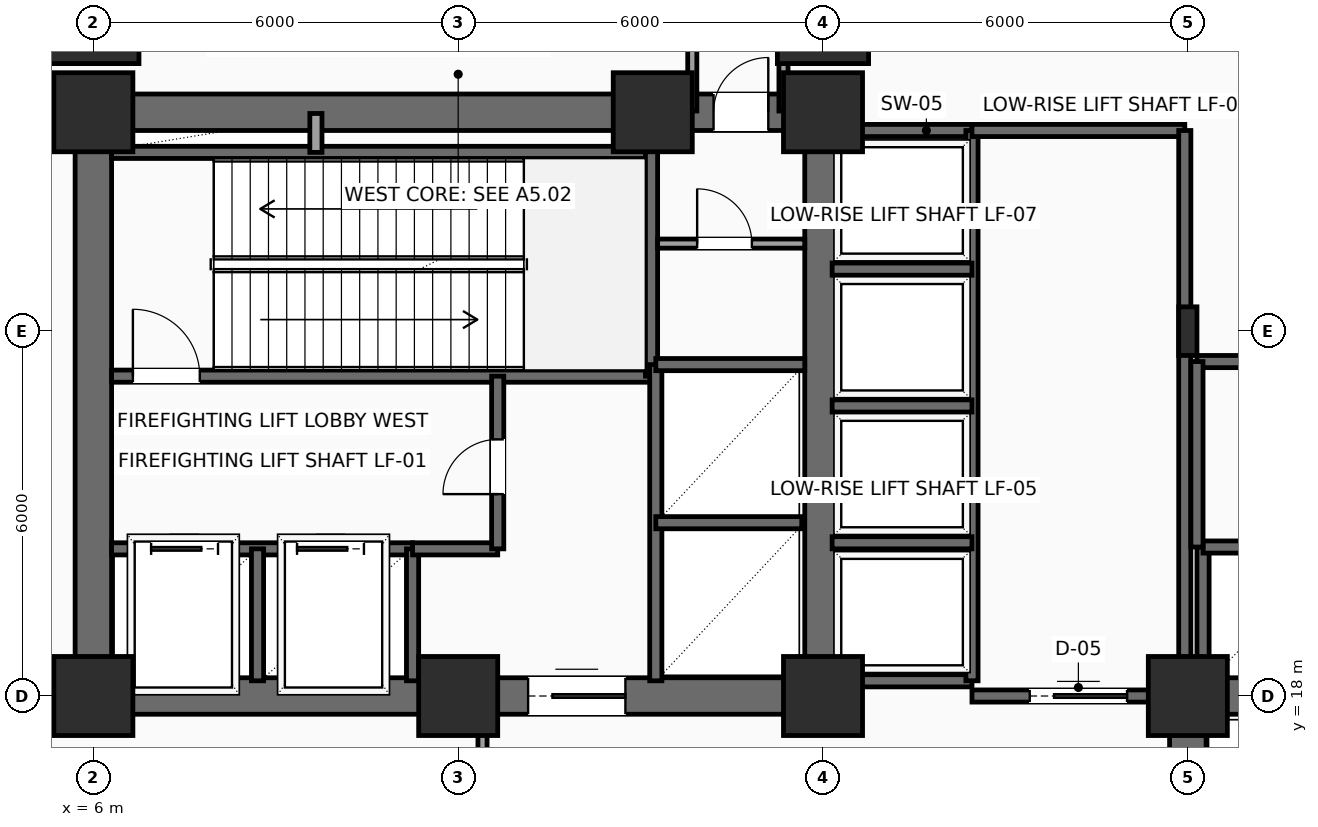
"""IFC4 building model, lengths in metres.
Left out: names, types, materials, properties, quantities, classifications, styles, units other than length and angle.
Written with IfcOpenShell. Run it as: python <this file> out.ifc"""

import sys

from ifc_helpers import new_model, si_unit, direction, frame, frame_2d, origin, origin_2d, place, context, subcontext, project, spatial, rectangle, i_section, extrude, element, fill, save


model = new_model("IFC4")
c1 = context("Model", 3, precision=1e-05, world=origin(), true_north=direction((0.0, 1.0)))
c2 = subcontext(c1, "Body", "Model", "MODEL_VIEW")
j1 = project(units=[si_unit("LENGTHUNIT", "METRE"), si_unit("PLANEANGLEUNIT", "RADIAN")], contexts=[c1])
p1 = place(None, origin())
s1 = spatial("IfcSite", under=j1, at=p1, CompositionType="ELEMENT")
p2 = place(p1, origin())
s2 = spatial("IfcBuilding", under=s1, at=p2, CompositionType="ELEMENT")
p3 = place(p2, frame((0.0, 0.0, 16.5)))
s3 = spatial("IfcBuildingStorey", under=s2, at=p3, CompositionType="ELEMENT", Elevation=16.5)
for number, where, z_axis, x_axis in (
    (1, (6.0, 18.0, 0.0), (0.0, 0.0, 1.0), (1.0, 0.0, 0.0)),
    (2, (12.0, 18.0, 0.0), (0.0, 0.0, 1.0), (1.0, 0.0, 0.0)),
    (3, (18.0, 18.0, 0.0), (0.0, 0.0, 1.0), (1.0, 0.0, 0.0)),
    (4, (6.0, 27.6, 0.0), (0.0, 0.0, 1.0), (1.0, 0.0, 0.0)),
    (5, (15.2, 27.6, 0.0), (0.0, 0.0, 1.0), (1.0, 0.0, 0.0)),
    (6, (18.0, 27.6, 0.0), (0.0, 0.0, 1.0), (1.0, 0.0, 0.0)),
    (7, (24.0, 18.0, 0.0), (0.0, 0.0, 1.0), (1.0, 0.0, 0.0)),
):
    element("IfcColumn", number, at=place(p3, frame(where, z_axis=z_axis, x_axis=x_axis)), inside=s3, PredefinedType="COLUMN", context=c2, shape_type="SweptSolid", body=[
        extrude(rectangle(XDim=1.3, YDim=1.3, at=origin_2d()), origin(), (0.0, 0.0, 1.0), 5.4),
    ])
for number, where, z_axis, x_axis in (
    (8, (6.0, 29.15, 0.0), (0.0, 0.0, 1.0), (1.0, 0.0, 0.0)),
    (9, (18.0, 29.15, 0.0), (0.0, 0.0, 1.0), (1.0, 0.0, 0.0)),
):
    element("IfcColumn", number, at=place(p3, frame(where, z_axis=z_axis, x_axis=x_axis)), inside=s3, PredefinedType="COLUMN", context=c2, shape_type="SweptSolid", body=[
        extrude(rectangle(XDim=1.5, YDim=1.5, at=origin_2d()), origin(), (0.0, 0.0, 1.0), 5.4),
    ])
p4 = place(p3, frame((24.0, 24.0, 0.0), z_axis=(0.0, 0.0, 1.0), x_axis=(1.0, 0.0, 0.0)))
e10 = element("IfcColumn", 10, at=p4, inside=s3, PredefinedType="COLUMN", context=c2, shape_type="SweptSolid", body=[
    extrude(i_section(OverallWidth=0.3, OverallDepth=0.8, WebThickness=0.018, FlangeThickness=0.033, FilletRadius=0.03, at=origin_2d()), origin(), (0.0, 0.0, 1.0), 5.4),
])
p5 = place(p3, frame((6.0, 18.0, 0.0), z_axis=(0.0, 0.0, 1.0), x_axis=(1.0, 0.0, 0.0)))
e11 = element("IfcWall", 11, at=p5, inside=s3, PredefinedType="SHEAR", context=c2, shape_type="SweptSolid", body=[
    extrude(rectangle(XDim=12.0, YDim=0.6, at=frame_2d((6.0, 0.0))), origin(), (0.0, 0.0, 1.0), 5.125),
])
p6 = place(p5, frame((7.15, 0.0, 0.0)))
e12 = element("IfcOpeningElement", 12, at=p6, cuts=e11, PredefinedType="OPENING", context=c2, shape_type="SweptSolid", body=[
    extrude(rectangle(XDim=1.6, YDim=2.3, at=frame_2d((0.8, 1.15))), frame((0.0, 0.31, 0.0), z_axis=(0.0, -1.0, 0.0), x_axis=(1.0, 0.0, 0.0)), (0.0, 0.0, 1.0), 0.62),
])
p7 = place(p3, frame((6.0, 27.6, 0.0), z_axis=(0.0, 0.0, 1.0), x_axis=(1.0, 0.0, 0.0)))
e13 = element("IfcWall", 13, at=p7, inside=s3, PredefinedType="SHEAR", context=c2, shape_type="SweptSolid", body=[
    extrude(rectangle(XDim=12.0, YDim=0.6, at=frame_2d((6.0, 0.0))), origin(), (0.0, 0.0, 1.0), 5.125),
])
p8 = place(p7, frame((10.2, 0.0, 0.0)))
e14 = element("IfcOpeningElement", 14, at=p8, cuts=e13, PredefinedType="OPENING", context=c2, shape_type="SweptSolid", body=[
    extrude(rectangle(XDim=0.9, YDim=2.15, at=frame_2d((0.45, 1.075))), frame((0.0, 0.31, 0.0), z_axis=(0.0, -1.0, 0.0), x_axis=(1.0, 0.0, 0.0)), (0.0, 0.0, 1.0), 0.62),
])
for number, where, z_axis, x_axis in (
    (15, (6.0, 18.0, 0.0), (0.0, 0.0, 1.0), (0.0, 1.0, 0.0)),
    (16, (18.0, 18.0, 0.0), (0.0, 0.0, 1.0), (0.0, 1.0, 0.0)),
    (17, (24.0, 18.0, 0.0), (0.0, 0.0, 1.0), (1.0, 0.0, 0.0)),
):
    element("IfcWall", number, at=place(p3, frame(where, z_axis=z_axis, x_axis=x_axis)), inside=s3, PredefinedType="SHEAR", context=c2, shape_type="SweptSolid", body=[
        extrude(rectangle(XDim=9.6, YDim=0.6, at=frame_2d((4.8, 0.0))), origin(), (0.0, 0.0, 1.0), 5.125),
    ])
p9 = place(p3, frame((24.0, 6.0, 0.0), z_axis=(0.0, 0.0, 1.0), x_axis=(0.0, 1.0, 0.0)))
e18 = element("IfcWall", 18, at=p9, inside=s3, PredefinedType="SHEAR", context=c2, shape_type="SweptSolid", body=[
    extrude(rectangle(XDim=12.0, YDim=0.6, at=frame_2d((6.0, 0.0))), origin(), (0.0, 0.0, 1.0), 5.125),
])
p10 = place(p9, frame((7.15, 0.0, 0.0)))
e19 = element("IfcOpeningElement", 19, at=p10, cuts=e18, PredefinedType="OPENING", context=c2, shape_type="SweptSolid", body=[
    extrude(rectangle(XDim=1.6, YDim=2.3, at=frame_2d((0.8, 1.15))), frame((0.0, 0.31, 0.0), z_axis=(0.0, -1.0, 0.0), x_axis=(1.0, 0.0, 0.0)), (0.0, 0.0, 1.0), 0.62),
])
p11 = place(p3, frame((6.3, 23.26, 0.0), z_axis=(0.0, 0.0, 1.0), x_axis=(1.0, 0.0, 0.0)))
e20 = element("IfcWall", 20, at=p11, inside=s3, PredefinedType="SHEAR", context=c2, shape_type="SweptSolid", body=[
    extrude(rectangle(XDim=8.88, YDim=0.2, at=frame_2d((4.44, 0.0))), origin(), (0.0, 0.0, 1.0), 5.125),
])
p12 = place(p11, frame((0.35, 0.0, 0.0)))
e21 = element("IfcOpeningElement", 21, at=p12, cuts=e20, PredefinedType="OPENING", context=c2, shape_type="SweptSolid", body=[
    extrude(rectangle(XDim=1.1, YDim=2.2, at=frame_2d((0.55, 1.1))), frame((0.0, 0.11, 0.0), z_axis=(0.0, -1.0, 0.0), x_axis=(1.0, 0.0, 0.0)), (0.0, 0.0, 1.0), 0.22),
])
p13 = place(p3, frame((6.3, 26.94, 0.0), z_axis=(0.0, 0.0, 1.0), x_axis=(1.0, 0.0, 0.0)))
e22 = element("IfcWall", 22, at=p13, inside=s3, PredefinedType="SHEAR", context=c2, shape_type="SweptSolid", body=[
    extrude(rectangle(XDim=8.88, YDim=0.2, at=frame_2d((4.44, 0.0))), origin(), (0.0, 0.0, 1.0), 5.125),
])
p14 = place(p3, frame((15.18, 23.26, 0.0), z_axis=(0.0, 0.0, 1.0), x_axis=(0.0, 1.0, 0.0)))
e23 = element("IfcWall", 23, at=p14, inside=s3, PredefinedType="SHEAR", context=c2, shape_type="SweptSolid", body=[
    extrude(rectangle(XDim=4.04, YDim=0.2, at=frame_2d((2.02, 0.0))), origin(), (0.0, 0.0, 1.0), 5.125),
])
p15 = place(p3, frame((6.3, 20.42, 0.0), z_axis=(0.0, 0.0, 1.0), x_axis=(1.0, 0.0, 0.0)))
e24 = element("IfcWall", 24, at=p15, inside=s3, PredefinedType="SHEAR", context=c2, shape_type="SweptSolid", body=[
    extrude(rectangle(XDim=4.95, YDim=0.2, at=frame_2d((2.475, 0.0))), origin(), (0.0, 0.0, 1.0), 5.125),
])
p16 = place(p15, frame((0.65, 0.0, 0.0)))
e25 = element("IfcOpeningElement", 25, at=p16, cuts=e24, PredefinedType="OPENING", context=c2, shape_type="SweptSolid", body=[
    extrude(rectangle(XDim=1.1, YDim=2.2, at=frame_2d((0.55, 1.1))), frame((0.0, 0.11, 0.0), z_axis=(0.0, -1.0, 0.0), x_axis=(1.0, 0.0, 0.0)), (0.0, 0.0, 1.0), 0.22),
])
p17 = place(p15, frame((3.05, 0.0, 0.0)))
e26 = element("IfcOpeningElement", 26, at=p17, cuts=e24, PredefinedType="OPENING", context=c2, shape_type="SweptSolid", body=[
    extrude(rectangle(XDim=1.1, YDim=2.2, at=frame_2d((0.55, 1.1))), frame((0.0, 0.11, 0.0), z_axis=(0.0, -1.0, 0.0), x_axis=(1.0, 0.0, 0.0)), (0.0, 0.0, 1.0), 0.22),
])
for number, where, z_axis, x_axis in (
    (27, (8.7, 18.25, 0.0), (0.0, 0.0, 1.0), (0.0, 1.0, 0.0)),
    (28, (11.25, 18.25, 0.0), (0.0, 0.0, 1.0), (0.0, 1.0, 0.0)),
):
    element("IfcWall", number, at=place(p3, frame(where, z_axis=z_axis, x_axis=x_axis)), inside=s3, PredefinedType="SHEAR", context=c2, shape_type="SweptSolid", body=[
        extrude(rectangle(XDim=2.17, YDim=0.2, at=frame_2d((1.085, 0.0))), origin(), (0.0, 0.0, 1.0), 5.125),
    ])
p18 = place(p3, frame((11.25, 20.42, 0.0), z_axis=(0.0, 0.0, 1.0), x_axis=(1.0, 0.0, 0.0)))
e29 = element("IfcWall", 29, at=p18, inside=s3, PredefinedType="SHEAR", context=c2, shape_type="SweptSolid", body=[
    extrude(rectangle(XDim=1.4, YDim=0.2, at=frame_2d((0.7, 0.0))), origin(), (0.0, 0.0, 1.0), 5.125),
])
p19 = place(p3, frame((12.65, 20.42, 0.0), z_axis=(0.0, 0.0, 1.0), x_axis=(0.0, 1.0, 0.0)))
e30 = element("IfcWall", 30, at=p19, inside=s3, PredefinedType="SHEAR", context=c2, shape_type="SweptSolid", body=[
    extrude(rectangle(XDim=2.84, YDim=0.2, at=frame_2d((1.42, 0.0))), origin(), (0.0, 0.0, 1.0), 5.125),
])
p20 = place(p19, frame((0.9, 0.0, 0.0)))
e31 = element("IfcOpeningElement", 31, at=p20, cuts=e30, PredefinedType="OPENING", context=c2, shape_type="SweptSolid", body=[
    extrude(rectangle(XDim=0.9, YDim=2.15, at=frame_2d((0.45, 1.075))), frame((0.0, 0.11, 0.0), z_axis=(0.0, -1.0, 0.0), x_axis=(1.0, 0.0, 0.0)), (0.0, 0.0, 1.0), 0.22),
])
p21 = place(p3, frame((9.66, 26.94, 0.0), z_axis=(0.0, 0.0, 1.0), x_axis=(0.0, 1.0, 0.0)))
e32 = element("IfcWall", 32, at=p21, inside=s3, PredefinedType="SOLIDWALL", context=c2, shape_type="SweptSolid", body=[
    extrude(rectangle(XDim=0.64, YDim=0.2, at=frame_2d((0.32, 0.0))), origin(), (0.0, 0.0, 1.0), 5.125),
])
p22 = place(p3, frame((15.25, 18.25, 0.0), z_axis=(0.0, 0.0, 1.0), x_axis=(0.0, 1.0, 0.0)))
e33 = element("IfcWall", 33, at=p22, inside=s3, PredefinedType="SHEAR", context=c2, shape_type="SweptSolid", body=[
    extrude(rectangle(XDim=5.2, YDim=0.2, at=frame_2d((2.6, 0.0))), origin(), (0.0, 0.0, 1.0), 5.125),
])
p23 = place(p3, frame((15.25, 20.85, 0.0), z_axis=(0.0, 0.0, 1.0), x_axis=(1.0, 0.0, 0.0)))
e34 = element("IfcWall", 34, at=p23, inside=s3, PredefinedType="SHEAR", context=c2, shape_type="SweptSolid", body=[
    extrude(rectangle(XDim=2.4, YDim=0.2, at=frame_2d((1.2, 0.0))), origin(), (0.0, 0.0, 1.0), 5.125),
])
p24 = place(p3, frame((15.25, 23.45, 0.0), z_axis=(0.0, 0.0, 1.0), x_axis=(1.0, 0.0, 0.0)))
e35 = element("IfcWall", 35, at=p24, inside=s3, PredefinedType="SHEAR", context=c2, shape_type="SweptSolid", body=[
    extrude(rectangle(XDim=2.45, YDim=0.2, at=frame_2d((1.225, 0.0))), origin(), (0.0, 0.0, 1.0), 5.125),
])
p25 = place(p3, frame((15.28, 25.44, 0.0), z_axis=(0.0, 0.0, 1.0), x_axis=(1.0, 0.0, 0.0)))
e36 = element("IfcWall", 36, at=p25, inside=s3, PredefinedType="PARTITIONING", context=c2, shape_type="SweptSolid", body=[
    extrude(rectangle(XDim=2.42, YDim=0.15, at=frame_2d((1.21, 0.0))), origin(), (0.0, 0.0, 1.0), 5.125),
])
p26 = place(p25, frame((0.65, 0.0, 0.0)))
e37 = element("IfcOpeningElement", 37, at=p26, cuts=e36, PredefinedType="OPENING", context=c2, shape_type="SweptSolid", body=[
    extrude(rectangle(XDim=0.9, YDim=2.15, at=frame_2d((0.45, 1.075))), frame((0.0, 0.085, 0.0), z_axis=(0.0, -1.0, 0.0), x_axis=(1.0, 0.0, 0.0)), (0.0, 0.0, 1.0), 0.17),
])
for number, where, z_axis, x_axis in (
    (38, (18.1, 27.3, 0.0), (0.0, 0.0, 1.0), (1.0, 0.0, 0.0)),
    (39, (18.1, 18.25, 0.0), (0.0, 0.0, 1.0), (1.0, 0.0, 0.0)),
):
    element("IfcWall", number, at=place(p3, frame(where, z_axis=z_axis, x_axis=x_axis)), inside=s3, PredefinedType="SHEAR", context=c2, shape_type="SweptSolid", body=[
        extrude(rectangle(XDim=2.35, YDim=0.2, at=frame_2d((1.175, 0.0))), origin(), (0.0, 0.0, 1.0), 5.125),
    ])
p27 = place(p3, frame((20.45, 18.25, 0.0), z_axis=(0.0, 0.0, 1.0), x_axis=(0.0, 1.0, 0.0)))
e40 = element("IfcWall", 40, at=p27, inside=s3, PredefinedType="SHEAR", context=c2, shape_type="SweptSolid", body=[
    extrude(rectangle(XDim=9.05, YDim=0.2, at=frame_2d((4.525, 0.0))), origin(), (0.0, 0.0, 1.0), 5.125),
])
for number, where, z_axis, x_axis in (
    (41, (18.15, 20.52, 0.0), (0.0, 0.0, 1.0), (1.0, 0.0, 0.0)),
    (42, (18.15, 22.77, 0.0), (0.0, 0.0, 1.0), (1.0, 0.0, 0.0)),
    (43, (18.15, 25.02, 0.0), (0.0, 0.0, 1.0), (1.0, 0.0, 0.0)),
):
    element("IfcWall", number, at=place(p3, frame(where, z_axis=z_axis, x_axis=x_axis)), inside=s3, PredefinedType="SHEAR", context=c2, shape_type="SweptSolid", body=[
        extrude(rectangle(XDim=2.3, YDim=0.2, at=frame_2d((1.15, 0.0))), origin(), (0.0, 0.0, 1.0), 5.125),
    ])
p28 = place(p3, frame((20.45, 18.0, 0.0), z_axis=(0.0, 0.0, 1.0), x_axis=(1.0, 0.0, 0.0)))
e44 = element("IfcWall", 44, at=p28, inside=s3, PredefinedType="SHEAR", context=c2, shape_type="SweptSolid", body=[
    extrude(rectangle(XDim=3.5, YDim=0.2, at=frame_2d((1.75, 0.0))), origin(), (0.0, 0.0, 1.0), 5.125),
])
p29 = place(p28, frame((0.95, 0.0, 0.0)))
e45 = element("IfcOpeningElement", 45, at=p29, cuts=e44, PredefinedType="OPENING", context=c2, shape_type="SweptSolid", body=[
    extrude(rectangle(XDim=1.6, YDim=2.3, at=frame_2d((0.8, 1.15))), frame((0.0, 0.11, 0.0), z_axis=(0.0, -1.0, 0.0), x_axis=(1.0, 0.0, 0.0)), (0.0, 0.0, 1.0), 0.22),
])
p30 = place(p3, frame((20.45, 27.3, 0.0), z_axis=(0.0, 0.0, 1.0), x_axis=(1.0, 0.0, 0.0)))
e46 = element("IfcWall", 46, at=p30, inside=s3, PredefinedType="SHEAR", context=c2, shape_type="SweptSolid", body=[
    extrude(rectangle(XDim=3.5, YDim=0.2, at=frame_2d((1.75, 0.0))), origin(), (0.0, 0.0, 1.0), 5.125),
])
p31 = place(p3, frame((23.95, 18.0, 0.0), z_axis=(0.0, 0.0, 1.0), x_axis=(0.0, 1.0, 0.0)))
e47 = element("IfcWall", 47, at=p31, inside=s3, PredefinedType="SHEAR", context=c2, shape_type="SweptSolid", body=[
    extrude(rectangle(XDim=9.3, YDim=0.2, at=frame_2d((4.65, 0.0))), origin(), (0.0, 0.0, 1.0), 5.125),
])
p32 = place(p3, frame((24.25, 18.1, 0.0), z_axis=(0.0, 0.0, 1.0), x_axis=(0.0, 1.0, 0.0)))
e48 = element("IfcWall", 48, at=p32, inside=s3, PredefinedType="SHEAR", context=c2, shape_type="SweptSolid", body=[
    extrude(rectangle(XDim=2.35, YDim=0.2, at=frame_2d((1.175, 0.0))), origin(), (0.0, 0.0, 1.0), 5.125),
])
p33 = place(p3, frame((24.25, 20.45, 0.0), z_axis=(0.0, 0.0, 1.0), x_axis=(1.0, 0.0, 0.0)))
e49 = element("IfcWall", 49, at=p33, inside=s3, PredefinedType="SHEAR", context=c2, shape_type="SweptSolid", body=[
    extrude(rectangle(XDim=9.05, YDim=0.2, at=frame_2d((4.525, 0.0))), origin(), (0.0, 0.0, 1.0), 5.125),
])
p34 = place(p3, frame((24.15, 23.5, 0.0), z_axis=(0.0, 0.0, 1.0), x_axis=(1.0, 0.0, 0.0)))
e50 = element("IfcWall", 50, at=p34, inside=s3, PredefinedType="SHEAR", context=c2, shape_type="SweptSolid", body=[
    extrude(rectangle(XDim=9.15, YDim=0.2, at=frame_2d((4.575, 0.0))), origin(), (0.0, 0.0, 1.0), 5.125),
])
p35 = place(p34, frame((1.15, 0.0, 0.0)))
e51 = element("IfcOpeningElement", 51, at=p35, cuts=e50, PredefinedType="OPENING", context=c2, shape_type="SweptSolid", body=[
    extrude(rectangle(XDim=1.6, YDim=2.3, at=frame_2d((0.8, 1.15))), frame((0.0, 0.11, 0.0), z_axis=(0.0, -1.0, 0.0), x_axis=(1.0, 0.0, 0.0)), (0.0, 0.0, 1.0), 0.22),
])
p36 = place(p3, frame((24.15, 20.45, 0.0), z_axis=(0.0, 0.0, 1.0), x_axis=(0.0, 1.0, 0.0)))
e52 = element("IfcWall", 52, at=p36, inside=s3, PredefinedType="SHEAR", context=c2, shape_type="SweptSolid", body=[
    extrude(rectangle(XDim=3.05, YDim=0.2, at=frame_2d((1.525, 0.0))), origin(), (0.0, 0.0, 1.0), 5.125),
])
p37 = place(p3, frame((12.4, 16.55, 0.0), z_axis=(0.0, 0.0, 1.0), x_axis=(0.0, 1.0, 0.0)))
e53 = element("IfcWall", 53, at=p37, inside=s3, PredefinedType="PARTITIONING", context=c2, shape_type="SweptSolid", body=[
    extrude(rectangle(XDim=1.41, YDim=0.15, at=frame_2d((0.705, 0.0))), origin(), (0.0, 0.0, 1.0), 5.125),
])
for number, where, z_axis, x_axis in (
    (54, (17.35, 30.2, 0.0), (0.0, 0.0, 1.0), (0.0, -1.0, 0.0)),
    (55, (15.85, 27.62, 0.0), (0.0, 0.0, 1.0), (0.0, 1.0, 0.0)),
):
    element("IfcWall", number, at=place(p3, frame(where, z_axis=z_axis, x_axis=x_axis)), inside=s3, PredefinedType="PARTITIONING", context=c2, shape_type="SweptSolid", body=[
        extrude(rectangle(XDim=2.58, YDim=0.15, at=frame_2d((1.29, 0.0))), origin(), (0.0, 0.0, 1.0), 5.125),
    ])
p38 = place(p6, origin())
e56 = element("IfcDoor", 56, at=p38, inside=s3, OperationType="DOUBLE_DOOR_SLIDING", PredefinedType="DOOR", context=c2, shape_type="SweptSolid", body=[
    extrude(rectangle(XDim=1.6, YDim=2.3, at=frame_2d((0.8, 1.15))), frame((0.0, 0.025, 0.0), z_axis=(0.0, -1.0, 0.0), x_axis=(1.0, 0.0, 0.0)), (0.0, 0.0, 1.0), 0.05),
])
fill(e12, e56)
p39 = place(p8, origin())
e57 = element("IfcDoor", 57, at=p39, inside=s3, OperationType="SINGLE_SWING_RIGHT", PredefinedType="DOOR", context=c2, shape_type="SweptSolid", body=[
    extrude(rectangle(XDim=0.9, YDim=2.15, at=frame_2d((0.45, 1.075))), frame((0.0, 0.025, 0.0), z_axis=(0.0, -1.0, 0.0), x_axis=(1.0, 0.0, 0.0)), (0.0, 0.0, 1.0), 0.05),
])
fill(e14, e57)
p40 = place(p12, origin())
e58 = element("IfcDoor", 58, at=p40, inside=s3, OperationType="SINGLE_SWING_LEFT", PredefinedType="DOOR", context=c2, shape_type="SweptSolid", body=[
    extrude(rectangle(XDim=1.1, YDim=2.2, at=frame_2d((0.55, 1.1))), frame((0.0, 0.025, 0.0), z_axis=(0.0, -1.0, 0.0), x_axis=(1.0, 0.0, 0.0)), (0.0, 0.0, 1.0), 0.05),
])
fill(e21, e58)
p41 = place(p16, origin())
e59 = element("IfcDoor", 59, at=p41, inside=s3, OperationType="SLIDING_TO_LEFT", PredefinedType="DOOR", context=c2, shape_type="SweptSolid", body=[
    extrude(rectangle(XDim=1.1, YDim=2.2, at=frame_2d((0.55, 1.1))), frame((0.0, 0.025, 0.0), z_axis=(0.0, -1.0, 0.0), x_axis=(1.0, 0.0, 0.0)), (0.0, 0.0, 1.0), 0.05),
])
fill(e25, e59)
p42 = place(p17, origin())
e60 = element("IfcDoor", 60, at=p42, inside=s3, OperationType="SLIDING_TO_LEFT", PredefinedType="DOOR", context=c2, shape_type="SweptSolid", body=[
    extrude(rectangle(XDim=1.1, YDim=2.2, at=frame_2d((0.55, 1.1))), frame((0.0, 0.025, 0.0), z_axis=(0.0, -1.0, 0.0), x_axis=(1.0, 0.0, 0.0)), (0.0, 0.0, 1.0), 0.05),
])
fill(e26, e60)
p43 = place(p20, origin())
e61 = element("IfcDoor", 61, at=p43, inside=s3, OperationType="SINGLE_SWING_LEFT", PredefinedType="DOOR", context=c2, shape_type="SweptSolid", body=[
    extrude(rectangle(XDim=0.9, YDim=2.15, at=frame_2d((0.45, 1.075))), frame((0.0, 0.025, 0.0), z_axis=(0.0, -1.0, 0.0), x_axis=(1.0, 0.0, 0.0)), (0.0, 0.0, 1.0), 0.05),
])
fill(e31, e61)
p44 = place(p26, origin())
e62 = element("IfcDoor", 62, at=p44, inside=s3, OperationType="SINGLE_SWING_LEFT", PredefinedType="DOOR", context=c2, shape_type="SweptSolid", body=[
    extrude(rectangle(XDim=0.9, YDim=2.15, at=frame_2d((0.45, 1.075))), frame((0.0, 0.025, 0.0), z_axis=(0.0, -1.0, 0.0), x_axis=(1.0, 0.0, 0.0)), (0.0, 0.0, 1.0), 0.05),
])
fill(e37, e62)
p45 = place(p29, origin())
e63 = element("IfcDoor", 63, at=p45, inside=s3, OperationType="DOUBLE_DOOR_SLIDING", PredefinedType="DOOR", context=c2, shape_type="SweptSolid", body=[
    extrude(rectangle(XDim=1.6, YDim=2.3, at=frame_2d((0.8, 1.15))), frame((0.0, 0.025, 0.0), z_axis=(0.0, -1.0, 0.0), x_axis=(1.0, 0.0, 0.0)), (0.0, 0.0, 1.0), 0.05),
])
fill(e45, e63)
save(model, sys.argv[1])
